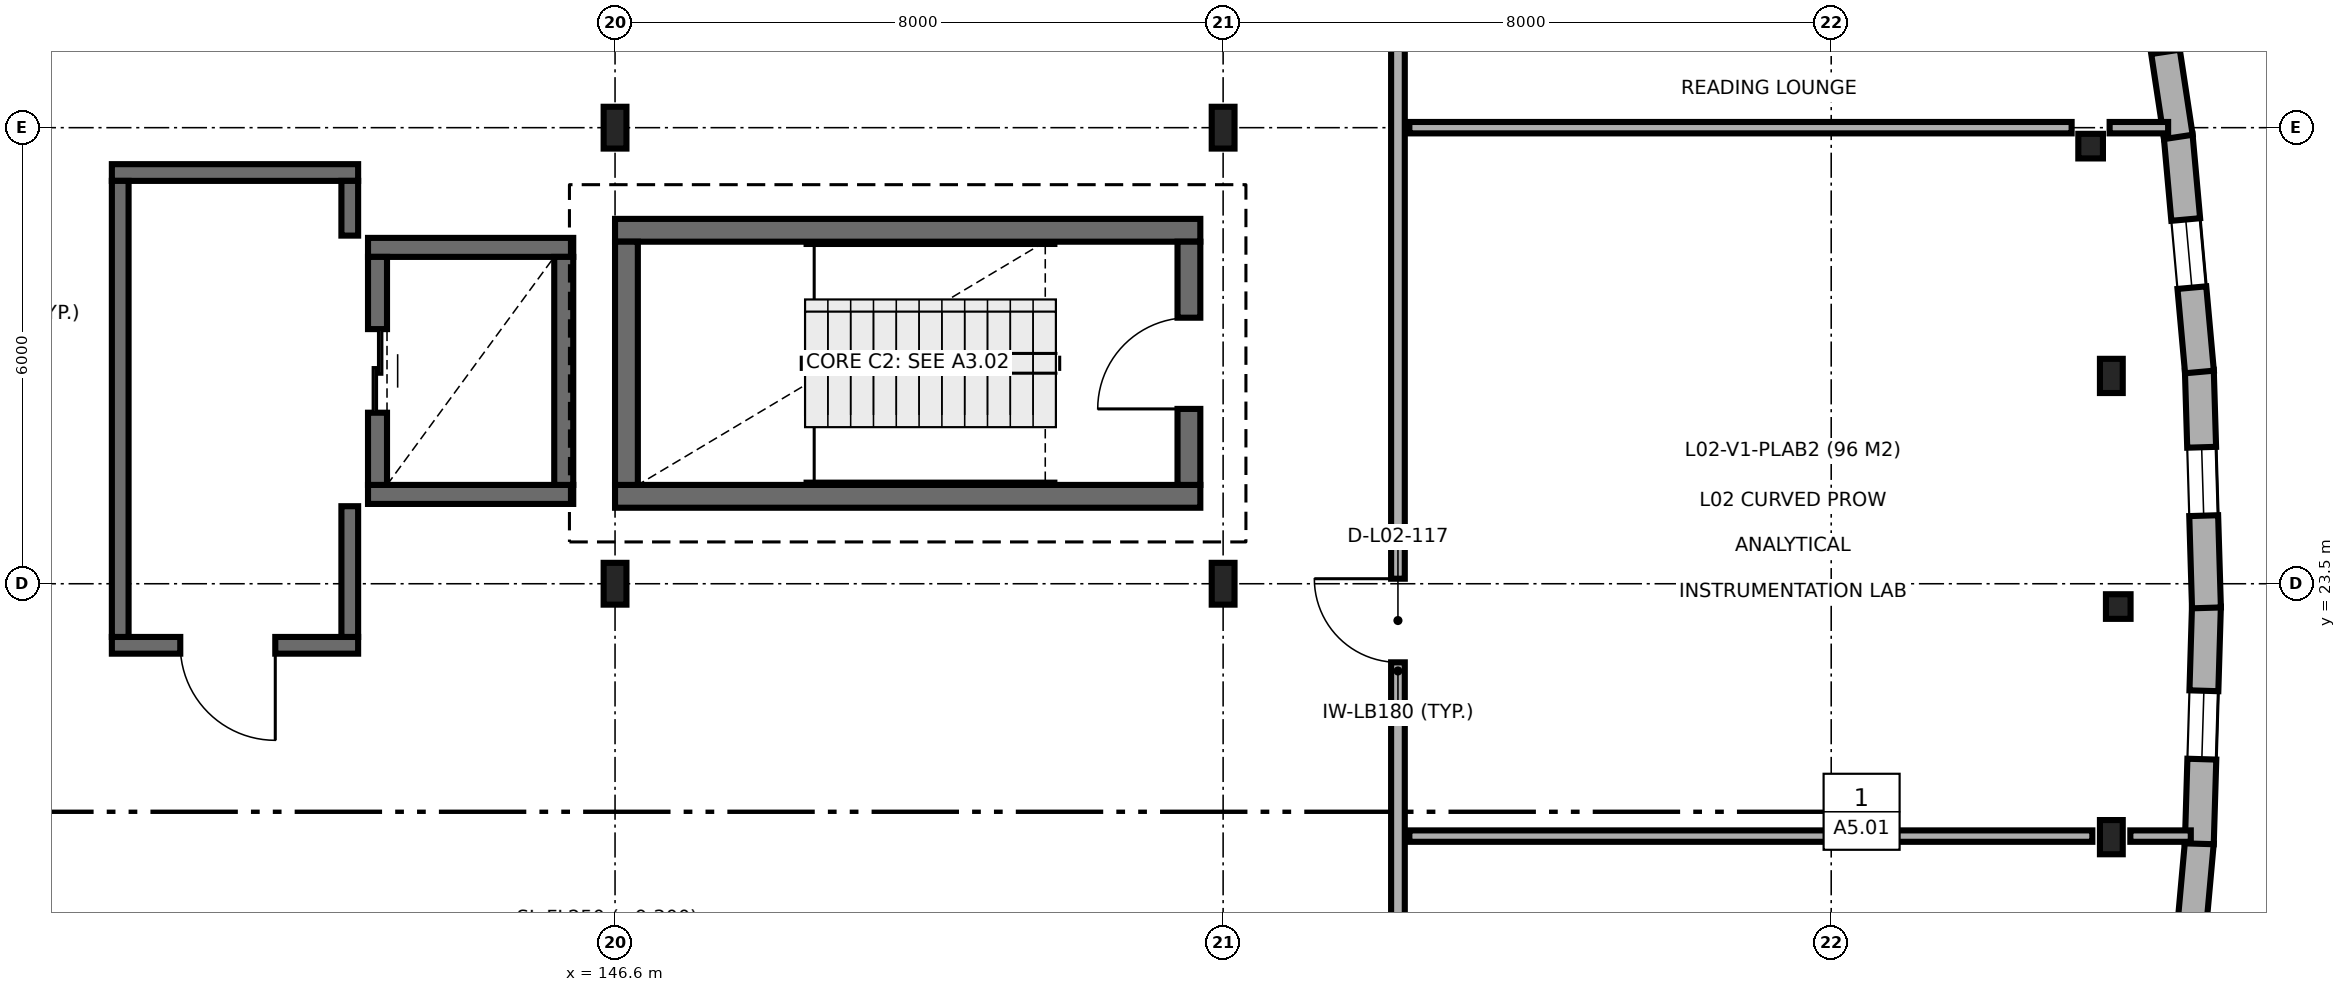
"""IFC4 building model, lengths in metres.
Left out: names, types, materials, properties, quantities, classifications, styles, units other than length and angle.
Written with IfcOpenShell. Run it as: python <this file> out.ifc"""

import sys

from ifc_helpers import new_model, si_unit, direction, frame, frame_2d, origin, origin_2d, place, context, subcontext, project, spatial, rectangle, hollow_circle, i_section, extrude, element, fill, save


model = new_model("IFC4")
c1 = context("Model", 3, precision=1e-05, world=origin(), true_north=direction((0.0, 1.0)))
c2 = subcontext(c1, "Body", "Model", "MODEL_VIEW")
j1 = project(units=[si_unit("LENGTHUNIT", "METRE"), si_unit("PLANEANGLEUNIT", "RADIAN")], contexts=[c1])
p1 = place(None, origin())
s1 = spatial("IfcSite", under=j1, at=p1, CompositionType="ELEMENT")
p2 = place(p1, origin())
s2 = spatial("IfcBuilding", under=s1, at=p2, CompositionType="ELEMENT")
p3 = place(p2, frame((0.0, 0.0, 9.3)))
s3 = spatial("IfcBuildingStorey", under=s2, at=p3, CompositionType="ELEMENT", Elevation=9.3)
for number, where, z_axis, x_axis in (
    (1, (146.6, 23.5, 0.0), (0.0, 0.0, 1.0), (1.0, 0.0, 0.0)),
    (2, (146.6, 29.5, 0.0), (0.0, 0.0, 1.0), (1.0, 0.0, 0.0)),
    (3, (154.6, 23.5, 0.0), (0.0, 0.0, 1.0), (1.0, 0.0, 0.0)),
    (4, (154.6, 29.5, 0.0), (0.0, 0.0, 1.0), (1.0, 0.0, 0.0)),
):
    element("IfcColumn", number, at=place(p3, frame(where, z_axis=z_axis, x_axis=x_axis)), inside=s3, PredefinedType="COLUMN", context=c2, shape_type="SweptSolid", body=[
        extrude(i_section(OverallWidth=0.3, OverallDepth=0.55, WebThickness=0.015, FlangeThickness=0.029, FilletRadius=0.027, at=origin_2d()), origin(), (0.0, 0.0, 1.0), 4.5),
    ])
p4 = place(p3, frame((166.013, 29.257, 0.0), z_axis=(0.0, 0.0, 1.0), x_axis=(1.0, 0.0, 0.0)))
e5 = element("IfcColumn", 5, at=p4, inside=s3, PredefinedType="COLUMN", context=c2, shape_type="SweptSolid", body=[
    extrude(hollow_circle(Radius=0.162, WallThickness=0.016, at=origin_2d()), origin(), (0.0, 0.0, 1.0), 4.5),
])
for number, where, z_axis, x_axis in (
    (6, (166.285, 20.166, 0.0), (0.0, 0.0, 1.0), (1.0, 0.0, 0.0)),
    (7, (166.285, 26.234, 0.0), (0.0, 0.0, 1.0), (1.0, 0.0, 0.0)),
):
    element("IfcColumn", number, at=place(p3, frame(where, z_axis=z_axis, x_axis=x_axis)), inside=s3, PredefinedType="COLUMN", context=c2, shape_type="SweptSolid", body=[
        extrude(i_section(OverallWidth=0.3, OverallDepth=0.45, WebThickness=0.014, FlangeThickness=0.026, FilletRadius=0.027, at=origin_2d()), origin(), (0.0, 0.0, 1.0), 4.5),
    ])
p5 = place(p3, frame((166.376, 23.2, 0.0), z_axis=(0.0, 0.0, 1.0), x_axis=(1.0, 0.0, 0.0)))
e8 = element("IfcColumn", 8, at=p5, inside=s3, PredefinedType="COLUMN", context=c2, shape_type="SweptSolid", body=[
    extrude(hollow_circle(Radius=0.162, WallThickness=0.016, at=origin_2d()), origin(), (0.0, 0.0, 1.0), 4.5),
])
for number, where, z_axis, x_axis in (
    (9, (146.6, 24.65, 0.0), (0.0, 0.0, 1.0), (1.0, 0.0, 0.0)),
    (10, (154.3, 28.15, 0.0), (0.0, 0.0, 1.0), (-1.0, 0.0, 0.0)),
):
    element("IfcWall", number, at=place(p3, frame(where, z_axis=z_axis, x_axis=x_axis)), inside=s3, PredefinedType="SHEAR", context=c2, shape_type="SweptSolid", body=[
        extrude(rectangle(XDim=7.7, YDim=0.3, at=frame_2d((3.85, 0.0))), origin(), (0.0, 0.0, 1.0), 4.5),
    ])
p6 = place(p3, frame((146.75, 28.0, 0.0), z_axis=(0.0, 0.0, 1.0), x_axis=(0.0, -1.0, 0.0)))
e11 = element("IfcWall", 11, at=p6, inside=s3, PredefinedType="SHEAR", context=c2, shape_type="SweptSolid", body=[
    extrude(rectangle(XDim=3.2, YDim=0.3, at=frame_2d((1.6, 0.0))), origin(), (0.0, 0.0, 1.0), 4.5),
])
p7 = place(p3, frame((154.15, 24.8, 0.0), z_axis=(0.0, 0.0, 1.0), x_axis=(0.0, 1.0, 0.0)))
e12 = element("IfcWall", 12, at=p7, inside=s3, PredefinedType="SHEAR", context=c2, shape_type="SweptSolid", body=[
    extrude(rectangle(XDim=3.2, YDim=0.3, at=frame_2d((1.6, 0.0))), origin(), (0.0, 0.0, 1.0), 4.5),
])
p8 = place(p7, frame((1.0, 0.0, 0.0)))
e13 = element("IfcOpeningElement", 13, at=p8, cuts=e12, PredefinedType="OPENING", context=c2, shape_type="SweptSolid", body=[
    extrude(rectangle(XDim=1.2, YDim=2.15, at=frame_2d((0.6, 1.075))), frame((0.0, 0.16, 0.0), z_axis=(0.0, -1.0, 0.0), x_axis=(1.0, 0.0, 0.0)), (0.0, 0.0, 1.0), 0.32),
])
for number, where, z_axis, x_axis in (
    (14, (143.35, 24.675, 0.0), (0.0, 0.0, 1.0), (1.0, 0.0, 0.0)),
    (15, (146.05, 27.925, 0.0), (0.0, 0.0, 1.0), (-1.0, 0.0, 0.0)),
):
    element("IfcWall", number, at=place(p3, frame(where, z_axis=z_axis, x_axis=x_axis)), inside=s3, PredefinedType="SHEAR", context=c2, shape_type="SweptSolid", body=[
        extrude(rectangle(XDim=2.7, YDim=0.25, at=frame_2d((1.35, 0.0))), origin(), (0.0, 0.0, 1.0), 4.5),
    ])
p9 = place(p3, frame((143.475, 27.8, 0.0), z_axis=(0.0, 0.0, 1.0), x_axis=(0.0, -1.0, 0.0)))
e16 = element("IfcWall", 16, at=p9, inside=s3, PredefinedType="SHEAR", context=c2, shape_type="SweptSolid", body=[
    extrude(rectangle(XDim=3.0, YDim=0.25, at=frame_2d((1.5, 0.0))), origin(), (0.0, 0.0, 1.0), 4.5),
])
p10 = place(p9, frame((0.95, 0.0, 0.0)))
e17 = element("IfcOpeningElement", 17, at=p10, cuts=e16, PredefinedType="OPENING", context=c2, shape_type="SweptSolid", body=[
    extrude(rectangle(XDim=1.1, YDim=2.15, at=frame_2d((0.55, 1.075))), frame((0.0, 0.135, 0.0), z_axis=(0.0, -1.0, 0.0), x_axis=(1.0, 0.0, 0.0)), (0.0, 0.0, 1.0), 0.27),
])
p11 = place(p3, frame((145.925, 24.8, 0.0), z_axis=(0.0, 0.0, 1.0), x_axis=(0.0, 1.0, 0.0)))
e18 = element("IfcWall", 18, at=p11, inside=s3, PredefinedType="SHEAR", context=c2, shape_type="SweptSolid", body=[
    extrude(rectangle(XDim=3.0, YDim=0.25, at=frame_2d((1.5, 0.0))), origin(), (0.0, 0.0, 1.0), 4.5),
])
p12 = place(p3, frame((139.98, 22.69, 0.0), z_axis=(0.0, 0.0, 1.0), x_axis=(1.0, 0.0, 0.0)))
e19 = element("IfcWall", 19, at=p12, inside=s3, PredefinedType="SOLIDWALL", context=c2, shape_type="SweptSolid", body=[
    extrude(rectangle(XDim=3.24, YDim=0.22, at=frame_2d((1.62, 0.0))), origin(), (0.0, 0.0, 1.0), 4.25),
])
p13 = place(p12, frame((0.9, 0.0, 0.0)))
e20 = element("IfcOpeningElement", 20, at=p13, cuts=e19, PredefinedType="OPENING", context=c2, shape_type="SweptSolid", body=[
    extrude(rectangle(XDim=1.25, YDim=2.15, at=frame_2d((0.625, 1.075))), frame((0.0, 0.12, 0.0), z_axis=(0.0, -1.0, 0.0), x_axis=(1.0, 0.0, 0.0)), (0.0, 0.0, 1.0), 0.24),
])
p14 = place(p3, frame((143.22, 28.91, 0.0), z_axis=(0.0, 0.0, 1.0), x_axis=(-1.0, 0.0, 0.0)))
e21 = element("IfcWall", 21, at=p14, inside=s3, PredefinedType="SOLIDWALL", context=c2, shape_type="SweptSolid", body=[
    extrude(rectangle(XDim=3.24, YDim=0.22, at=frame_2d((1.62, 0.0))), origin(), (0.0, 0.0, 1.0), 4.25),
])
p15 = place(p3, frame((140.09, 28.8, 0.0), z_axis=(0.0, 0.0, 1.0), x_axis=(0.0, -1.0, 0.0)))
e22 = element("IfcWall", 22, at=p15, inside=s3, PredefinedType="SOLIDWALL", context=c2, shape_type="SweptSolid", body=[
    extrude(rectangle(XDim=6.0, YDim=0.22, at=frame_2d((3.0, 0.0))), origin(), (0.0, 0.0, 1.0), 4.25),
])
p16 = place(p3, frame((143.11, 22.8, 0.0), z_axis=(0.0, 0.0, 1.0), x_axis=(0.0, 1.0, 0.0)))
e23 = element("IfcWall", 23, at=p16, inside=s3, PredefinedType="SOLIDWALL", context=c2, shape_type="SweptSolid", body=[
    extrude(rectangle(XDim=1.72, YDim=0.22, at=frame_2d((0.86, 0.0))), origin(), (0.0, 0.0, 1.0), 4.25),
])
p17 = place(p3, frame((143.11, 28.08, 0.0), z_axis=(0.0, 0.0, 1.0), x_axis=(0.0, 1.0, 0.0)))
e24 = element("IfcWall", 24, at=p17, inside=s3, PredefinedType="SOLIDWALL", context=c2, shape_type="SweptSolid", body=[
    extrude(rectangle(XDim=0.72, YDim=0.22, at=frame_2d((0.36, 0.0))), origin(), (0.0, 0.0, 1.0), 4.25),
])
p18 = place(p3, frame((167.163, 16.987, 0.0), z_axis=(0.0, 0.0, 1.0), x_axis=(0.089747627339, 0.995964539222, 0.0)))
e25 = element("IfcWall", 25, at=p18, inside=s3, PredefinedType="SOLIDWALL", context=c2, shape_type="SweptSolid", body=[
    extrude(rectangle(XDim=3.128, YDim=0.38, at=frame_2d((1.564, 0.0))), origin(), (0.0, 0.0, 1.0), 4.25),
])
p19 = place(p18, frame((1.114, 0.0, 0.9)))
e26 = element("IfcOpeningElement", 26, at=p19, cuts=e25, PredefinedType="OPENING", context=c2, shape_type="SweptSolid", body=[
    extrude(rectangle(XDim=0.9, YDim=1.8, at=frame_2d((0.45, 0.9))), frame((0.0, 0.2, 0.0), z_axis=(0.0, -1.0, 0.0), x_axis=(1.0, 0.0, 0.0)), (0.0, 0.0, 1.0), 0.4),
])
p20 = place(p3, frame((167.443, 20.079, 0.0), z_axis=(0.0, 0.0, 1.0), x_axis=(0.02996779607, 0.999550864738, 0.0)))
e27 = element("IfcWall", 27, at=p20, inside=s3, PredefinedType="SOLIDWALL", context=c2, shape_type="SweptSolid", body=[
    extrude(rectangle(XDim=3.128, YDim=0.38, at=frame_2d((1.564, 0.0))), origin(), (0.0, 0.0, 1.0), 4.25),
])
p21 = place(p20, frame((1.114, 0.0, 0.9)))
e28 = element("IfcOpeningElement", 28, at=p21, cuts=e27, PredefinedType="OPENING", context=c2, shape_type="SweptSolid", body=[
    extrude(rectangle(XDim=0.9, YDim=1.8, at=frame_2d((0.45, 0.9))), frame((0.0, 0.2, 0.0), z_axis=(0.0, -1.0, 0.0), x_axis=(1.0, 0.0, 0.0)), (0.0, 0.0, 1.0), 0.4),
])
p22 = place(p3, frame((167.537, 23.182, 0.0), z_axis=(0.0, 0.0, 1.0), x_axis=(-0.029970133922, 0.999550794644, 0.0)))
e29 = element("IfcWall", 29, at=p22, inside=s3, PredefinedType="SOLIDWALL", context=c2, shape_type="SweptSolid", body=[
    extrude(rectangle(XDim=3.128, YDim=0.38, at=frame_2d((1.564, 0.0))), origin(), (0.0, 0.0, 1.0), 4.25),
])
p23 = place(p22, frame((1.214, 0.0, 0.9)))
e30 = element("IfcOpeningElement", 30, at=p23, cuts=e29, PredefinedType="OPENING", context=c2, shape_type="SweptSolid", body=[
    extrude(rectangle(XDim=0.9, YDim=1.8, at=frame_2d((0.45, 0.9))), frame((0.0, 0.2, 0.0), z_axis=(0.0, -1.0, 0.0), x_axis=(1.0, 0.0, 0.0)), (0.0, 0.0, 1.0), 0.4),
])
p24 = place(p3, frame((167.445, 26.286, 0.0), z_axis=(0.0, 0.0, 1.0), x_axis=(-0.089747627339, 0.995964539222, 0.0)))
e31 = element("IfcWall", 31, at=p24, inside=s3, PredefinedType="SOLIDWALL", context=c2, shape_type="SweptSolid", body=[
    extrude(rectangle(XDim=3.128, YDim=0.38, at=frame_2d((1.564, 0.0))), origin(), (0.0, 0.0, 1.0), 4.25),
])
p25 = place(p24, frame((1.114, 0.0, 0.9)))
e32 = element("IfcOpeningElement", 32, at=p25, cuts=e31, PredefinedType="OPENING", context=c2, shape_type="SweptSolid", body=[
    extrude(rectangle(XDim=0.9, YDim=1.8, at=frame_2d((0.45, 0.9))), frame((0.0, 0.2, 0.0), z_axis=(0.0, -1.0, 0.0), x_axis=(1.0, 0.0, 0.0)), (0.0, 0.0, 1.0), 0.4),
])
p26 = place(p3, frame((167.167, 29.378, 0.0), z_axis=(0.0, 0.0, 1.0), x_axis=(-0.149305964746, 0.988791044099, 0.0)))
e33 = element("IfcWall", 33, at=p26, inside=s3, PredefinedType="SOLIDWALL", context=c2, shape_type="SweptSolid", body=[
    extrude(rectangle(XDim=3.128, YDim=0.38, at=frame_2d((1.564, 0.0))), origin(), (0.0, 0.0, 1.0), 4.25),
])
p27 = place(p26, frame((1.132, 0.0, 0.9)))
e34 = element("IfcOpeningElement", 34, at=p27, cuts=e33, PredefinedType="OPENING", context=c2, shape_type="SweptSolid", body=[
    extrude(rectangle(XDim=0.9, YDim=1.8, at=frame_2d((0.45, 0.9))), frame((0.0, 0.2, 0.0), z_axis=(0.0, -1.0, 0.0), x_axis=(1.0, 0.0, 0.0)), (0.0, 0.0, 1.0), 0.4),
])
p28 = place(p3, frame((156.9, 5.205, 0.0), z_axis=(0.0, 0.0, 1.0), x_axis=(0.0, 1.0, 0.0)))
e35 = element("IfcWall", 35, at=p28, inside=s3, PredefinedType="PARTITIONING", context=c2, shape_type="SweptSolid", body=[
    extrude(rectangle(XDim=34.295, YDim=0.18, at=frame_2d((17.147, 0.0))), origin(), (0.0, 0.0, 1.0), 4.25),
])
p29 = place(p28, frame((6.559, 0.0, 0.0)))
e36 = element("IfcOpeningElement", 36, at=p29, cuts=e35, PredefinedType="OPENING", context=c2, shape_type="SweptSolid", body=[
    extrude(rectangle(XDim=1.5, YDim=2.2, at=frame_2d((0.75, 1.1))), frame((0.0, 0.1, 0.0), z_axis=(0.0, -1.0, 0.0), x_axis=(1.0, 0.0, 0.0)), (0.0, 0.0, 1.0), 0.2),
])
p30 = place(p28, frame((17.261, 0.0, 0.0)))
e37 = element("IfcOpeningElement", 37, at=p30, cuts=e35, PredefinedType="OPENING", context=c2, shape_type="SweptSolid", body=[
    extrude(rectangle(XDim=1.1, YDim=2.15, at=frame_2d((0.55, 1.075))), frame((0.0, 0.1, 0.0), z_axis=(0.0, -1.0, 0.0), x_axis=(1.0, 0.0, 0.0)), (0.0, 0.0, 1.0), 0.2),
])
p31 = place(p28, frame((27.343, 0.0, 0.0)))
e38 = element("IfcOpeningElement", 38, at=p31, cuts=e35, PredefinedType="OPENING", context=c2, shape_type="SweptSolid", body=[
    extrude(rectangle(XDim=0.95, YDim=2.1, at=frame_2d((0.475, 1.05))), frame((0.0, 0.1, 0.0), z_axis=(0.0, -1.0, 0.0), x_axis=(1.0, 0.0, 0.0)), (0.0, 0.0, 1.0), 0.2),
])
p32 = place(p3, frame((157.05, 20.18, 0.0), z_axis=(0.0, 0.0, 1.0), x_axis=(1.0, 0.0, 0.0)))
e39 = element("IfcWall", 39, at=p32, inside=s3, PredefinedType="PARTITIONING", context=c2, shape_type="SweptSolid", body=[
    extrude(rectangle(XDim=8.985, YDim=0.15, at=frame_2d((4.493, 0.0))), origin(), (0.0, 0.0, 1.0), 3.75),
])
p33 = place(p3, frame((166.535, 20.18, 0.0), z_axis=(0.0, 0.0, 1.0), x_axis=(1.0, 0.0, 0.0)))
e40 = element("IfcWall", 40, at=p33, inside=s3, PredefinedType="PARTITIONING", context=c2, shape_type="SweptSolid", body=[
    extrude(rectangle(XDim=0.795, YDim=0.15, at=frame_2d((0.398, 0.0))), origin(), (0.0, 0.0, 1.0), 3.75),
])
p34 = place(p3, frame((157.05, 29.5, 0.0), z_axis=(0.0, 0.0, 1.0), x_axis=(1.0, 0.0, 0.0)))
e41 = element("IfcWall", 41, at=p34, inside=s3, PredefinedType="PARTITIONING", context=c2, shape_type="SweptSolid", body=[
    extrude(rectangle(XDim=8.713, YDim=0.15, at=frame_2d((4.356, 0.0))), origin(), (0.0, 0.0, 1.0), 3.75),
])
p35 = place(p3, frame((166.263, 29.5, 0.0), z_axis=(0.0, 0.0, 1.0), x_axis=(1.0, 0.0, 0.0)))
e42 = element("IfcWall", 42, at=p35, inside=s3, PredefinedType="PARTITIONING", context=c2, shape_type="SweptSolid", body=[
    extrude(rectangle(XDim=0.77, YDim=0.15, at=frame_2d((0.385, 0.0))), origin(), (0.0, 0.0, 1.0), 4.25),
])
p36 = place(p8, origin())
e43 = element("IfcDoor", 43, at=p36, inside=s3, OperationType="SINGLE_SWING_LEFT", PredefinedType="DOOR", context=c2, shape_type="SweptSolid", body=[
    extrude(rectangle(XDim=1.2, YDim=2.15, at=frame_2d((0.6, 1.075))), frame((0.0, 0.025, 0.0), z_axis=(0.0, -1.0, 0.0), x_axis=(1.0, 0.0, 0.0)), (0.0, 0.0, 1.0), 0.05),
])
fill(e13, e43)
p37 = place(p10, origin())
e44 = element("IfcDoor", 44, at=p37, inside=s3, OperationType="DOUBLE_DOOR_SLIDING", PredefinedType="DOOR", context=c2, shape_type="SweptSolid", body=[
    extrude(rectangle(XDim=1.1, YDim=2.15, at=frame_2d((0.55, 1.075))), frame((0.0, 0.025, 0.0), z_axis=(0.0, -1.0, 0.0), x_axis=(1.0, 0.0, 0.0)), (0.0, 0.0, 1.0), 0.05),
])
fill(e17, e44)
p38 = place(p13, frame((1.25, 0.0, 0.0), z_axis=(0.0, 0.0, 1.0), x_axis=(-1.0, 0.0, 0.0)))
e45 = element("IfcDoor", 45, at=p38, inside=s3, OperationType="SINGLE_SWING_RIGHT", PredefinedType="DOOR", context=c2, shape_type="SweptSolid", body=[
    extrude(rectangle(XDim=1.25, YDim=2.15, at=frame_2d((0.625, 1.075))), frame((0.0, 0.025, 0.0), z_axis=(0.0, -1.0, 0.0), x_axis=(1.0, 0.0, 0.0)), (0.0, 0.0, 1.0), 0.05),
])
fill(e20, e45)
p39 = place(p21, origin())
e46 = element("IfcWindow", 46, at=p39, inside=s3, PartitioningType="SINGLE_PANEL", PredefinedType="WINDOW", context=c2, shape_type="SweptSolid", body=[
    extrude(rectangle(XDim=0.9, YDim=1.8, at=frame_2d((0.45, 0.9))), frame((0.0, 0.03, 0.0), z_axis=(0.0, -1.0, 0.0), x_axis=(1.0, 0.0, 0.0)), (0.0, 0.0, 1.0), 0.06),
])
fill(e28, e46)
p40 = place(p23, origin())
e47 = element("IfcWindow", 47, at=p40, inside=s3, PartitioningType="SINGLE_PANEL", PredefinedType="WINDOW", context=c2, shape_type="SweptSolid", body=[
    extrude(rectangle(XDim=0.9, YDim=1.8, at=frame_2d((0.45, 0.9))), frame((0.0, 0.03, 0.0), z_axis=(0.0, -1.0, 0.0), x_axis=(1.0, 0.0, 0.0)), (0.0, 0.0, 1.0), 0.06),
])
fill(e30, e47)
p41 = place(p25, origin())
e48 = element("IfcWindow", 48, at=p41, inside=s3, PartitioningType="SINGLE_PANEL", PredefinedType="WINDOW", context=c2, shape_type="SweptSolid", body=[
    extrude(rectangle(XDim=0.9, YDim=1.8, at=frame_2d((0.45, 0.9))), frame((0.0, 0.03, 0.0), z_axis=(0.0, -1.0, 0.0), x_axis=(1.0, 0.0, 0.0)), (0.0, 0.0, 1.0), 0.06),
])
fill(e32, e48)
p42 = place(p27, origin())
e49 = element("IfcWindow", 49, at=p42, inside=s3, PartitioningType="SINGLE_PANEL", PredefinedType="WINDOW", context=c2, shape_type="SweptSolid", body=[
    extrude(rectangle(XDim=0.9, YDim=1.8, at=frame_2d((0.45, 0.9))), frame((0.0, 0.03, 0.0), z_axis=(0.0, -1.0, 0.0), x_axis=(1.0, 0.0, 0.0)), (0.0, 0.0, 1.0), 0.06),
])
fill(e34, e49)
p43 = place(p30, origin())
e50 = element("IfcDoor", 50, at=p43, inside=s3, OperationType="SINGLE_SWING_RIGHT", PredefinedType="DOOR", context=c2, shape_type="SweptSolid", body=[
    extrude(rectangle(XDim=1.1, YDim=2.15, at=frame_2d((0.55, 1.075))), frame((0.0, 0.025, 0.0), z_axis=(0.0, -1.0, 0.0), x_axis=(1.0, 0.0, 0.0)), (0.0, 0.0, 1.0), 0.05),
])
fill(e37, e50)
save(model, sys.argv[1])
